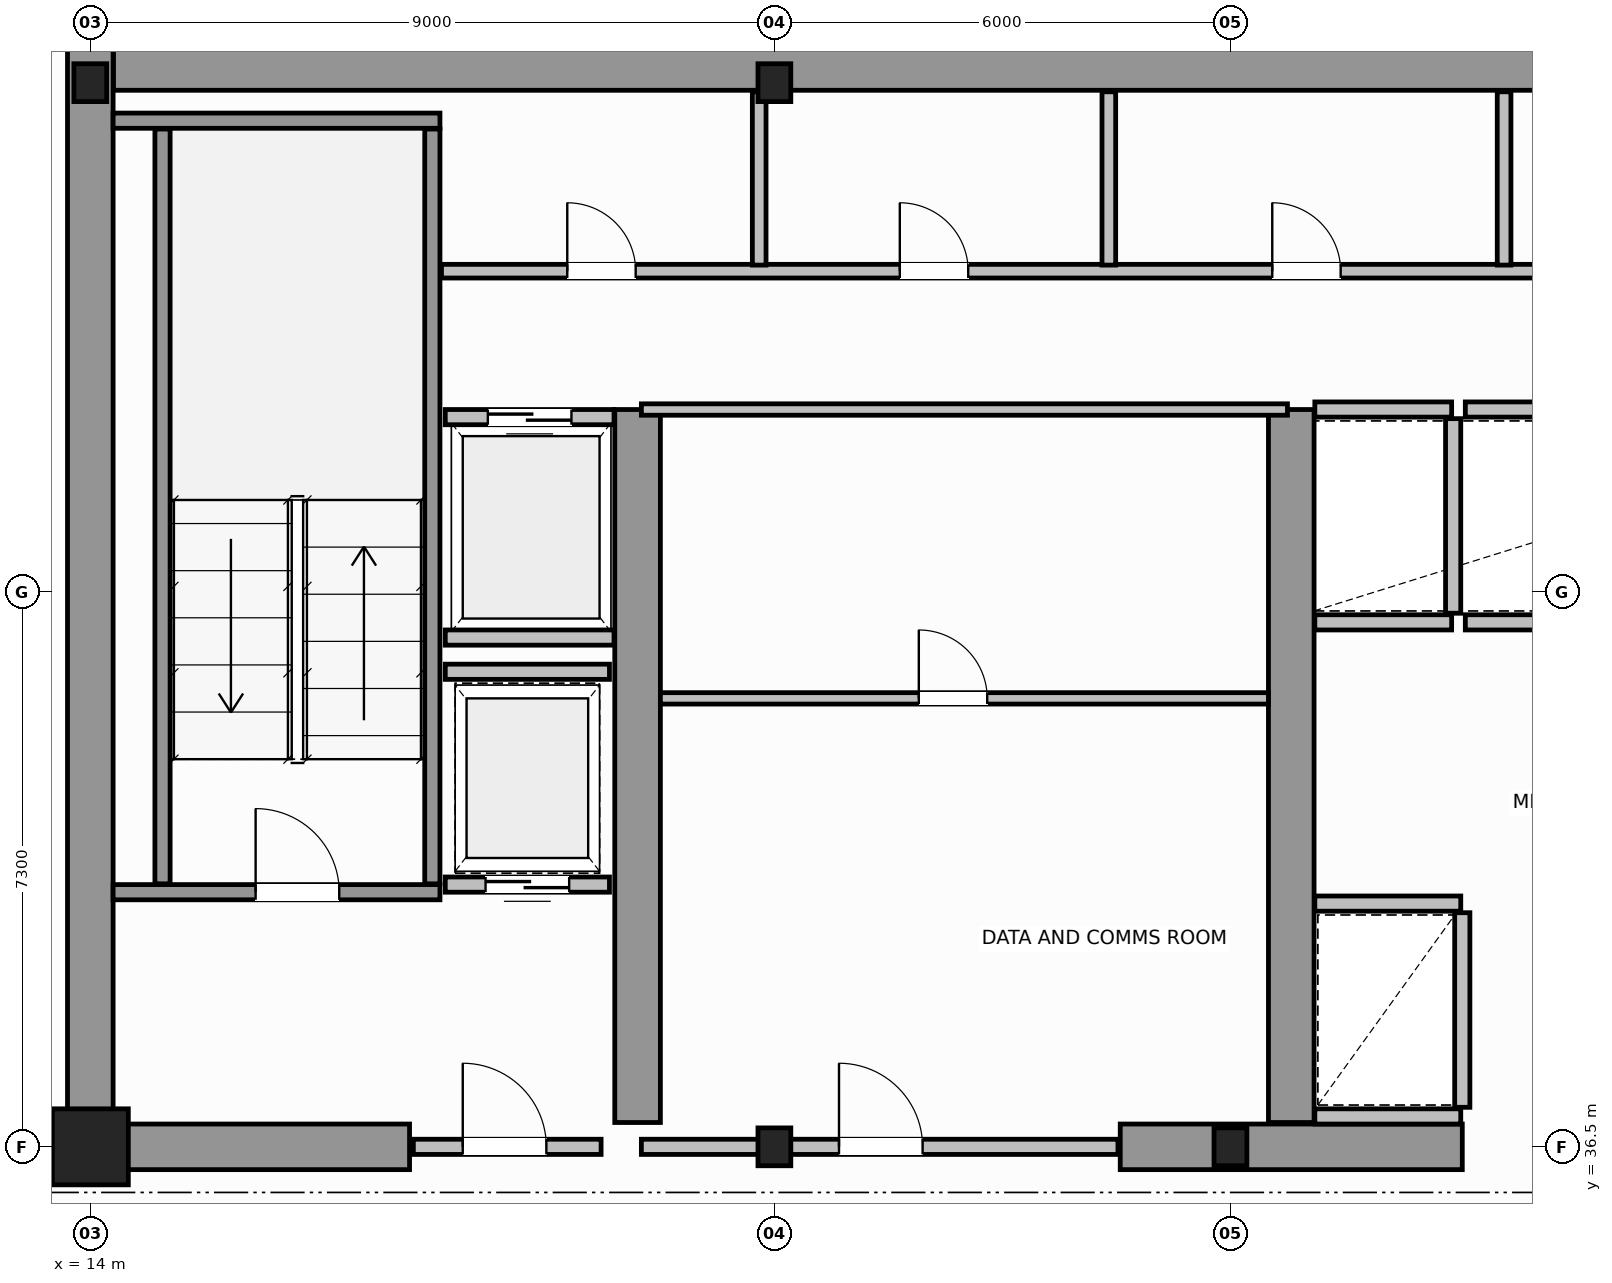
"""IFC4 building model, lengths in metres.
Left out: names, types, materials, properties, quantities, classifications, styles, units other than length and angle.
Written with IfcOpenShell. Run it as: python <this file> out.ifc"""

import sys

from ifc_helpers import new_model, si_unit, direction, frame, frame_2d, origin, origin_2d, place, context, subcontext, project, spatial, rectangle, i_section, extrude, source, transform, mapped, element, fill, save


model = new_model("IFC4")
c1 = context("Model", 3, precision=1e-05, world=origin(), true_north=direction((0.0, 1.0)))
c2 = subcontext(c1, "Body", "Model", "MODEL_VIEW")
j1 = project(units=[si_unit("LENGTHUNIT", "METRE"), si_unit("PLANEANGLEUNIT", "RADIAN")], contexts=[c1])
p1 = place(None, origin())
s1 = spatial("IfcSite", under=j1, at=p1, CompositionType="ELEMENT")
p2 = place(p1, origin())
s2 = spatial("IfcBuilding", under=s1, at=p2, CompositionType="ELEMENT")
p3 = place(p2, frame((0.0, 0.0, 203.2)))
s3 = spatial("IfcBuildingStorey", under=s2, at=p3, CompositionType="ELEMENT", Elevation=203.2)
m1 = source(origin(), c2, "Body", "SweptSolid", [
    extrude(rectangle(XDim=1.0, YDim=1.0, at=origin_2d()), origin(), (0.0, 0.0, 1.0), 3.8),
])
p4 = place(p3, frame((14.0, 36.5, 0.0), z_axis=(0.0, 0.0, 1.0), x_axis=(1.0, 0.0, 0.0)))
e1 = element("IfcColumn", 1, at=p4, inside=s3, PredefinedType="COLUMN", context=c2, shape_type="MappedRepresentation", body=[
    mapped(m1, transform((0.0, 0.0, 0.0), scale=1.0)),
])
m2 = source(origin(), c2, "Body", "SweptSolid", [
    extrude(i_section(OverallWidth=0.432, OverallDepth=0.498, WebThickness=0.055, FlangeThickness=0.068, FilletRadius=0.015, at=origin_2d()), origin(), (0.0, 0.0, 1.0), 3.8),
])
for number, where, z_axis, x_axis in (
    (2, (23.0, 36.5, 0.0), (0.0, 0.0, 1.0), (1.0, 0.0, 0.0)),
    (3, (29.0, 36.5, 0.0), (0.0, 0.0, 1.0), (1.0, 0.0, 0.0)),
    (4, (14.0, 50.5, 0.0), (0.0, 0.0, 1.0), (1.0, 0.0, 0.0)),
    (5, (23.0, 50.5, 0.0), (0.0, 0.0, 1.0), (1.0, 0.0, 0.0)),
):
    element("IfcColumn", number, at=place(p3, frame(where, z_axis=z_axis, x_axis=x_axis)), inside=s3, PredefinedType="COLUMN", context=c2, shape_type="MappedRepresentation", body=[
        mapped(m2, transform((0.0, 0.0, 0.0), scale=1.0)),
    ])
p5 = place(p3, frame((14.304, 50.7, 0.0), z_axis=(0.0, 0.0, 1.0), x_axis=(1.0, 0.0, 0.0)))
e6 = element("IfcWall", 6, at=p5, inside=s3, PredefinedType="SHEAR", context=c2, shape_type="SweptSolid", body=[
    extrude(rectangle(XDim=19.694, YDim=0.6, at=frame_2d((9.847, 0.0))), origin(), (0.0, 0.0, 1.0), 3.8),
])
p6 = place(p3, frame((14.0, 36.5, 0.0), z_axis=(0.0, 0.0, 1.0), x_axis=(0.0, 1.0, 0.0)))
e7 = element("IfcWall", 7, at=p6, inside=s3, PredefinedType="SHEAR", context=c2, shape_type="SweptSolid", body=[
    extrude(rectangle(XDim=14.5, YDim=0.6, at=frame_2d((7.25, 0.0))), origin(), (0.0, 0.0, 1.0), 3.8),
])
p7 = place(p3, frame((14.32, 36.5, 0.0), z_axis=(0.0, 0.0, 1.0), x_axis=(1.0, 0.0, 0.0)))
e8 = element("IfcWall", 8, at=p7, inside=s3, PredefinedType="SHEAR", context=c2, shape_type="SweptSolid", body=[
    extrude(rectangle(XDim=3.88, YDim=0.6, at=frame_2d((1.94, 0.0))), origin(), (0.0, 0.0, 1.0), 2.58),
])
p8 = place(p3, frame((27.55, 36.5, 0.0), z_axis=(0.0, 0.0, 1.0), x_axis=(1.0, 0.0, 0.0)))
e9 = element("IfcWall", 9, at=p8, inside=s3, PredefinedType="SHEAR", context=c2, shape_type="SweptSolid", body=[
    extrude(rectangle(XDim=4.5, YDim=0.6, at=frame_2d((2.25, 0.0))), origin(), (0.0, 0.0, 1.0), 3.8),
])
for number, where, z_axis, x_axis in (
    (10, (21.2, 36.82, 0.0), (0.0, 0.0, 1.0), (0.0, 1.0, 0.0)),
    (11, (29.8, 36.82, 0.0), (0.0, 0.0, 1.0), (0.0, 1.0, 0.0)),
):
    element("IfcWall", number, at=place(p3, frame(where, z_axis=z_axis, x_axis=x_axis)), inside=s3, PredefinedType="SHEAR", context=c2, shape_type="SweptSolid", body=[
        extrude(rectangle(XDim=9.38, YDim=0.6, at=frame_2d((4.69, 0.0))), origin(), (0.0, 0.0, 1.0), 3.8),
    ])
p9 = place(p3, frame((14.3, 39.85, 0.0), z_axis=(0.0, 0.0, 1.0), x_axis=(1.0, 0.0, 0.0)))
e12 = element("IfcWall", 12, at=p9, inside=s3, PredefinedType="SOLIDWALL", context=c2, shape_type="SweptSolid", body=[
    extrude(rectangle(XDim=4.3, YDim=0.2, at=frame_2d((2.15, 0.0))), origin(), (0.0, 0.0, 1.0), 3.8),
])
p10 = place(p9, frame((1.875, 0.0, 0.0)))
e13 = element("IfcOpeningElement", 13, at=p10, cuts=e12, PredefinedType="OPENING", context=c2, shape_type="SweptSolid", body=[
    extrude(rectangle(XDim=1.1, YDim=2.15, at=frame_2d((0.55, 1.075))), frame((0.0, 0.11, 0.0), z_axis=(0.0, -1.0, 0.0), x_axis=(1.0, 0.0, 0.0)), (0.0, 0.0, 1.0), 0.22),
])
p11 = place(p3, frame((14.3, 50.0, 0.0), z_axis=(0.0, 0.0, 1.0), x_axis=(1.0, 0.0, 0.0)))
e14 = element("IfcWall", 14, at=p11, inside=s3, PredefinedType="SOLIDWALL", context=c2, shape_type="SweptSolid", body=[
    extrude(rectangle(XDim=4.3, YDim=0.2, at=frame_2d((2.15, 0.0))), origin(), (0.0, 0.0, 1.0), 3.8),
])
for number, where, z_axis, x_axis in (
    (15, (14.95, 39.96, 0.0), (0.0, 0.0, 1.0), (0.0, 1.0, 0.0)),
    (16, (18.5, 39.96, 0.0), (0.0, 0.0, 1.0), (0.0, 1.0, 0.0)),
):
    element("IfcWall", number, at=place(p3, frame(where, z_axis=z_axis, x_axis=x_axis)), inside=s3, PredefinedType="SOLIDWALL", context=c2, shape_type="SweptSolid", body=[
        extrude(rectangle(XDim=9.93, YDim=0.2, at=frame_2d((4.965, 0.0))), origin(), (0.0, 0.0, 1.0), 3.8),
    ])
p12 = place(p3, frame((18.25, 36.5, 0.0), z_axis=(0.0, 0.0, 1.0), x_axis=(1.0, 0.0, 0.0)))
e17 = element("IfcWall", 17, at=p12, inside=s3, PredefinedType="SOLIDWALL", context=c2, shape_type="SweptSolid", body=[
    extrude(rectangle(XDim=2.47, YDim=0.2, at=frame_2d((1.235, 0.0))), origin(), (0.0, 0.0, 1.0), 2.57),
])
p13 = place(p12, frame((0.65, 0.0, 0.0)))
e18 = element("IfcOpeningElement", 18, at=p13, cuts=e17, PredefinedType="OPENING", context=c2, shape_type="SweptSolid", body=[
    extrude(rectangle(XDim=1.1, YDim=2.15, at=frame_2d((0.55, 1.075))), frame((0.0, 0.11, 0.0), z_axis=(0.0, -1.0, 0.0), x_axis=(1.0, 0.0, 0.0)), (0.0, 0.0, 1.0), 0.22),
])
p14 = place(p3, frame((30.11, 39.7, 0.0), z_axis=(0.0, 0.0, 1.0), x_axis=(1.0, 0.0, 0.0)))
e19 = element("IfcWall", 19, at=p14, inside=s3, PredefinedType="SOLIDWALL", context=c2, shape_type="SweptSolid", body=[
    extrude(rectangle(XDim=1.92, YDim=0.2, at=frame_2d((0.96, 0.0))), origin(), (0.0, 0.0, 1.0), 3.58),
])
p15 = place(p3, frame((30.11, 36.9, 0.0), z_axis=(0.0, 0.0, 1.0), x_axis=(1.0, 0.0, 0.0)))
e20 = element("IfcWall", 20, at=p15, inside=s3, PredefinedType="SOLIDWALL", context=c2, shape_type="SweptSolid", body=[
    extrude(rectangle(XDim=1.92, YDim=0.2, at=frame_2d((0.96, 0.0))), origin(), (0.0, 0.0, 1.0), 2.37),
])
p16 = place(p3, frame((32.05, 37.02, 0.0), z_axis=(0.0, 0.0, 1.0), x_axis=(0.0, 1.0, 0.0)))
e21 = element("IfcWall", 21, at=p16, inside=s3, PredefinedType="SOLIDWALL", context=c2, shape_type="SweptSolid", body=[
    extrude(rectangle(XDim=2.56, YDim=0.2, at=frame_2d((1.28, 0.0))), origin(), (0.0, 0.0, 1.0), 3.58),
])
for number, where, z_axis, x_axis in (
    (22, (30.11, 43.4, 0.0), (0.0, 0.0, 1.0), (1.0, 0.0, 0.0)),
    (23, (30.11, 46.2, 0.0), (0.0, 0.0, 1.0), (1.0, 0.0, 0.0)),
):
    element("IfcWall", number, at=place(p3, frame(where, z_axis=z_axis, x_axis=x_axis)), inside=s3, PredefinedType="SOLIDWALL", context=c2, shape_type="SweptSolid", body=[
        extrude(rectangle(XDim=1.8, YDim=0.2, at=frame_2d((0.9, 0.0))), origin(), (0.0, 0.0, 1.0), 3.58),
    ])
p17 = place(p3, frame((31.93, 43.52, 0.0), z_axis=(0.0, 0.0, 1.0), x_axis=(0.0, 1.0, 0.0)))
e24 = element("IfcWall", 24, at=p17, inside=s3, PredefinedType="SOLIDWALL", context=c2, shape_type="SweptSolid", body=[
    extrude(rectangle(XDim=2.56, YDim=0.2, at=frame_2d((1.28, 0.0))), origin(), (0.0, 0.0, 1.0), 3.58),
])
for number, where, z_axis, x_axis in (
    (25, (32.09, 43.4, 0.0), (0.0, 0.0, 1.0), (1.0, 0.0, 0.0)),
    (26, (32.09, 46.2, 0.0), (0.0, 0.0, 1.0), (1.0, 0.0, 0.0)),
):
    element("IfcWall", number, at=place(p3, frame(where, z_axis=z_axis, x_axis=x_axis)), inside=s3, PredefinedType="SOLIDWALL", context=c2, shape_type="SweptSolid", body=[
        extrude(rectangle(XDim=1.92, YDim=0.2, at=frame_2d((0.96, 0.0))), origin(), (0.0, 0.0, 1.0), 3.58),
    ])
p18 = place(p3, frame((18.67, 46.1, 0.0), z_axis=(0.0, 0.0, 1.0), x_axis=(1.0, 0.0, 0.0)))
e27 = element("IfcWall", 27, at=p18, inside=s3, PredefinedType="SOLIDWALL", context=c2, shape_type="SweptSolid", body=[
    extrude(rectangle(XDim=2.22, YDim=0.2, at=frame_2d((1.11, 0.0))), origin(), (0.0, 0.0, 1.0), 3.58),
])
p19 = place(p18, frame((0.56, 0.0, 0.0)))
e28 = element("IfcOpeningElement", 28, at=p19, cuts=e27, PredefinedType="OPENING", context=c2, shape_type="SweptSolid", body=[
    extrude(rectangle(XDim=1.1, YDim=2.15, at=frame_2d((0.55, 1.075))), frame((0.0, 0.11, 0.0), z_axis=(0.0, -1.0, 0.0), x_axis=(1.0, 0.0, 0.0)), (0.0, 0.0, 1.0), 0.22),
])
p20 = place(p3, frame((18.67, 43.2, 0.0), z_axis=(0.0, 0.0, 1.0), x_axis=(1.0, 0.0, 0.0)))
e29 = element("IfcWall", 29, at=p20, inside=s3, PredefinedType="SOLIDWALL", context=c2, shape_type="SweptSolid", body=[
    extrude(rectangle(XDim=2.22, YDim=0.2, at=frame_2d((1.11, 0.0))), origin(), (0.0, 0.0, 1.0), 3.58),
])
p21 = place(p3, frame((18.67, 39.95, 0.0), z_axis=(0.0, 0.0, 1.0), x_axis=(1.0, 0.0, 0.0)))
e30 = element("IfcWall", 30, at=p21, inside=s3, PredefinedType="SOLIDWALL", context=c2, shape_type="SweptSolid", body=[
    extrude(rectangle(XDim=2.16, YDim=0.2, at=frame_2d((1.08, 0.0))), origin(), (0.0, 0.0, 1.0), 3.58),
])
p22 = place(p21, frame((0.53, 0.0, 0.0)))
e31 = element("IfcOpeningElement", 31, at=p22, cuts=e30, PredefinedType="OPENING", context=c2, shape_type="SweptSolid", body=[
    extrude(rectangle(XDim=1.1, YDim=2.15, at=frame_2d((0.55, 1.075))), frame((0.0, 0.11, 0.0), z_axis=(0.0, -1.0, 0.0), x_axis=(1.0, 0.0, 0.0)), (0.0, 0.0, 1.0), 0.22),
])
p23 = place(p3, frame((18.67, 42.75, 0.0), z_axis=(0.0, 0.0, 1.0), x_axis=(1.0, 0.0, 0.0)))
e32 = element("IfcWall", 32, at=p23, inside=s3, PredefinedType="SOLIDWALL", context=c2, shape_type="SweptSolid", body=[
    extrude(rectangle(XDim=2.16, YDim=0.2, at=frame_2d((1.08, 0.0))), origin(), (0.0, 0.0, 1.0), 3.58),
])
p24 = place(p3, frame((21.25, 36.5, 0.0), z_axis=(0.0, 0.0, 1.0), x_axis=(1.0, 0.0, 0.0)))
e33 = element("IfcWall", 33, at=p24, inside=s3, PredefinedType="SOLIDWALL", context=c2, shape_type="SweptSolid", body=[
    extrude(rectangle(XDim=6.27, YDim=0.2, at=frame_2d((3.135, 0.0))), origin(), (0.0, 0.0, 1.0), 2.37),
])
p25 = place(p24, frame((2.6, 0.0, 0.0)))
e34 = element("IfcOpeningElement", 34, at=p25, cuts=e33, PredefinedType="OPENING", context=c2, shape_type="SweptSolid", body=[
    extrude(rectangle(XDim=1.1, YDim=2.15, at=frame_2d((0.55, 1.075))), frame((0.0, 0.11, 0.0), z_axis=(0.0, -1.0, 0.0), x_axis=(1.0, 0.0, 0.0)), (0.0, 0.0, 1.0), 0.22),
])
p26 = place(p3, frame((21.25, 46.2, 0.0), z_axis=(0.0, 0.0, 1.0), x_axis=(1.0, 0.0, 0.0)))
e35 = element("IfcWall", 35, at=p26, inside=s3, PredefinedType="PARTITIONING", context=c2, shape_type="SweptSolid", body=[
    extrude(rectangle(XDim=8.5, YDim=0.15, at=frame_2d((4.25, 0.0))), origin(), (0.0, 0.0, 1.0), 3.58),
])
p27 = place(p3, frame((21.5, 42.4, 0.0), z_axis=(0.0, 0.0, 1.0), x_axis=(1.0, 0.0, 0.0)))
e36 = element("IfcWall", 36, at=p27, inside=s3, PredefinedType="PARTITIONING", context=c2, shape_type="SweptSolid", body=[
    extrude(rectangle(XDim=8.0, YDim=0.15, at=frame_2d((4.0, 0.0))), origin(), (0.0, 0.0, 1.0), 3.58),
])
p28 = place(p27, frame((3.4, 0.0, 0.0)))
e37 = element("IfcOpeningElement", 37, at=p28, cuts=e36, PredefinedType="OPENING", context=c2, shape_type="SweptSolid", body=[
    extrude(rectangle(XDim=0.9, YDim=2.1, at=frame_2d((0.45, 1.05))), frame((0.0, 0.085, 0.0), z_axis=(0.0, -1.0, 0.0), x_axis=(1.0, 0.0, 0.0)), (0.0, 0.0, 1.0), 0.17),
])
p29 = place(p3, frame((18.62, 48.02, 0.0), z_axis=(0.0, 0.0, 1.0), x_axis=(1.0, 0.0, 0.0)))
e38 = element("IfcWall", 38, at=p29, inside=s3, PredefinedType="PLUMBINGWALL", context=c2, shape_type="SweptSolid", body=[
    extrude(rectangle(XDim=30.76, YDim=0.18, at=frame_2d((15.38, 0.0))), origin(), (0.0, 0.0, 1.0), 3.58),
])
p30 = place(p29, frame((1.655, 0.0, 0.0)))
e39 = element("IfcOpeningElement", 39, at=p30, cuts=e38, PredefinedType="OPENING", context=c2, shape_type="SweptSolid", body=[
    extrude(rectangle(XDim=0.9, YDim=2.15, at=frame_2d((0.45, 1.075))), frame((0.0, 0.1, 0.0), z_axis=(0.0, -1.0, 0.0), x_axis=(1.0, 0.0, 0.0)), (0.0, 0.0, 1.0), 0.2),
])
p31 = place(p29, frame((6.03, 0.0, 0.0)))
e40 = element("IfcOpeningElement", 40, at=p31, cuts=e38, PredefinedType="OPENING", context=c2, shape_type="SweptSolid", body=[
    extrude(rectangle(XDim=0.9, YDim=2.15, at=frame_2d((0.45, 1.075))), frame((0.0, 0.1, 0.0), z_axis=(0.0, -1.0, 0.0), x_axis=(1.0, 0.0, 0.0)), (0.0, 0.0, 1.0), 0.2),
])
p32 = place(p29, frame((10.93, 0.0, 0.0)))
e41 = element("IfcOpeningElement", 41, at=p32, cuts=e38, PredefinedType="OPENING", context=c2, shape_type="SweptSolid", body=[
    extrude(rectangle(XDim=0.9, YDim=2.15, at=frame_2d((0.45, 1.075))), frame((0.0, 0.1, 0.0), z_axis=(0.0, -1.0, 0.0), x_axis=(1.0, 0.0, 0.0)), (0.0, 0.0, 1.0), 0.2),
])
p33 = place(p29, frame((16.13, 0.0, 0.0)))
e42 = element("IfcOpeningElement", 42, at=p33, cuts=e38, PredefinedType="OPENING", context=c2, shape_type="SweptSolid", body=[
    extrude(rectangle(XDim=0.9, YDim=2.15, at=frame_2d((0.45, 1.075))), frame((0.0, 0.1, 0.0), z_axis=(0.0, -1.0, 0.0), x_axis=(1.0, 0.0, 0.0)), (0.0, 0.0, 1.0), 0.2),
])
p34 = place(p29, frame((21.73, 0.0, 0.0)))
e43 = element("IfcOpeningElement", 43, at=p34, cuts=e38, PredefinedType="OPENING", context=c2, shape_type="SweptSolid", body=[
    extrude(rectangle(XDim=0.9, YDim=2.15, at=frame_2d((0.45, 1.075))), frame((0.0, 0.1, 0.0), z_axis=(0.0, -1.0, 0.0), x_axis=(1.0, 0.0, 0.0)), (0.0, 0.0, 1.0), 0.2),
])
p35 = place(p29, frame((27.505, 0.0, 0.0)))
e44 = element("IfcOpeningElement", 44, at=p35, cuts=e38, PredefinedType="OPENING", context=c2, shape_type="SweptSolid", body=[
    extrude(rectangle(XDim=0.9, YDim=2.15, at=frame_2d((0.45, 1.075))), frame((0.0, 0.1, 0.0), z_axis=(0.0, -1.0, 0.0), x_axis=(1.0, 0.0, 0.0)), (0.0, 0.0, 1.0), 0.2),
])
p36 = place(p3, frame((22.8, 48.1, 0.0), z_axis=(0.0, 0.0, 1.0), x_axis=(0.0, 1.0, 0.0)))
e45 = element("IfcWall", 45, at=p36, inside=s3, PredefinedType="PLUMBINGWALL", context=c2, shape_type="SweptSolid", body=[
    extrude(rectangle(XDim=2.28, YDim=0.18, at=frame_2d((1.14, 0.0))), origin(), (0.0, 0.0, 1.0), 2.37),
])
for number, where, z_axis, x_axis in (
    (46, (27.4, 48.1, 0.0), (0.0, 0.0, 1.0), (0.0, 1.0, 0.0)),
    (47, (32.6, 48.1, 0.0), (0.0, 0.0, 1.0), (0.0, 1.0, 0.0)),
):
    element("IfcWall", number, at=place(p3, frame(where, z_axis=z_axis, x_axis=x_axis)), inside=s3, PredefinedType="PLUMBINGWALL", context=c2, shape_type="SweptSolid", body=[
        extrude(rectangle(XDim=2.28, YDim=0.18, at=frame_2d((1.14, 0.0))), origin(), (0.0, 0.0, 1.0), 3.58),
    ])
p37 = place(p3, frame((7.289, 36.48, 0.0), z_axis=(0.0, 0.0, 1.0), x_axis=(1.0, 0.0, 0.0)))
e48 = element("IfcWall", 48, at=p37, inside=s3, PredefinedType="PARTITIONING", context=c2, shape_type="SweptSolid", body=[
    extrude(rectangle(XDim=6.651, YDim=0.12, at=frame_2d((3.325, 0.0))), origin(), (0.0, 0.0, 1.0), 2.37),
])
p38 = place(p37, frame((2.875, 0.0, 0.0)))
e49 = element("IfcOpeningElement", 49, at=p38, cuts=e48, PredefinedType="OPENING", context=c2, shape_type="SweptSolid", body=[
    extrude(rectangle(XDim=0.9, YDim=2.15, at=frame_2d((0.45, 1.075))), frame((0.0, 0.07, 0.0), z_axis=(0.0, -1.0, 0.0), x_axis=(1.0, 0.0, 0.0)), (0.0, 0.0, 1.0), 0.14),
])
m3 = source(origin(), c2, "Body", "SweptSolid", [
    extrude(rectangle(XDim=1.1, YDim=2.15, at=frame_2d((0.55, 1.075))), frame((0.0, 0.025, 0.0), z_axis=(0.0, -1.0, 0.0), x_axis=(1.0, 0.0, 0.0)), (0.0, 0.0, 1.0), 0.05),
])
p39 = place(p10, origin())
e50 = element("IfcDoor", 50, at=p39, inside=s3, OperationType="SINGLE_SWING_LEFT", PredefinedType="DOOR", context=c2, shape_type="MappedRepresentation", body=[
    mapped(m3, transform((0.0, 0.0, 0.0), scale=1.0)),
])
fill(e13, e50)
p40 = place(p13, origin())
e51 = element("IfcDoor", 51, at=p40, inside=s3, OperationType="SINGLE_SWING_RIGHT", PredefinedType="DOOR", context=c2, shape_type="MappedRepresentation", body=[
    mapped(m3, transform((0.0, 0.0, 0.0), scale=1.0)),
])
fill(e18, e51)
p41 = place(p19, origin())
e52 = element("IfcDoor", 52, at=p41, inside=s3, OperationType="DOUBLE_DOOR_SLIDING", PredefinedType="DOOR", context=c2, shape_type="MappedRepresentation", body=[
    mapped(m3, transform((0.0, 0.0, 0.0), scale=1.0)),
])
fill(e28, e52)
p42 = place(p22, origin())
e53 = element("IfcDoor", 53, at=p42, inside=s3, OperationType="DOUBLE_DOOR_SLIDING", PredefinedType="DOOR", context=c2, shape_type="MappedRepresentation", body=[
    mapped(m3, transform((0.0, 0.0, 0.0), scale=1.0)),
])
fill(e31, e53)
p43 = place(p25, origin())
e54 = element("IfcDoor", 54, at=p43, inside=s3, OperationType="SINGLE_SWING_LEFT", PredefinedType="DOOR", context=c2, shape_type="MappedRepresentation", body=[
    mapped(m3, transform((0.0, 0.0, 0.0), scale=1.0)),
])
fill(e34, e54)
m4 = source(origin(), c2, "Body", "SweptSolid", [
    extrude(rectangle(XDim=0.9, YDim=2.1, at=frame_2d((0.45, 1.05))), frame((0.0, 0.025, 0.0), z_axis=(0.0, -1.0, 0.0), x_axis=(1.0, 0.0, 0.0)), (0.0, 0.0, 1.0), 0.05),
])
p44 = place(p28, origin())
e55 = element("IfcDoor", 55, at=p44, inside=s3, OperationType="SINGLE_SWING_RIGHT", PredefinedType="DOOR", context=c2, shape_type="MappedRepresentation", body=[
    mapped(m4, transform((0.0, 0.0, 0.0), scale=1.0)),
])
fill(e37, e55)
m5 = source(origin(), c2, "Body", "SweptSolid", [
    extrude(rectangle(XDim=0.9, YDim=2.15, at=frame_2d((0.45, 1.075))), frame((0.0, 0.025, 0.0), z_axis=(0.0, -1.0, 0.0), x_axis=(1.0, 0.0, 0.0)), (0.0, 0.0, 1.0), 0.05),
])
p45 = place(p30, origin())
e56 = element("IfcDoor", 56, at=p45, inside=s3, OperationType="SINGLE_SWING_LEFT", PredefinedType="DOOR", context=c2, shape_type="MappedRepresentation", body=[
    mapped(m5, transform((0.0, 0.0, 0.0), scale=1.0)),
])
fill(e39, e56)
p46 = place(p31, origin())
e57 = element("IfcDoor", 57, at=p46, inside=s3, OperationType="SINGLE_SWING_RIGHT", PredefinedType="DOOR", context=c2, shape_type="MappedRepresentation", body=[
    mapped(m5, transform((0.0, 0.0, 0.0), scale=1.0)),
])
fill(e40, e57)
p47 = place(p32, origin())
e58 = element("IfcDoor", 58, at=p47, inside=s3, OperationType="SINGLE_SWING_LEFT", PredefinedType="DOOR", context=c2, shape_type="MappedRepresentation", body=[
    mapped(m5, transform((0.0, 0.0, 0.0), scale=1.0)),
])
fill(e41, e58)
save(model, sys.argv[1])
